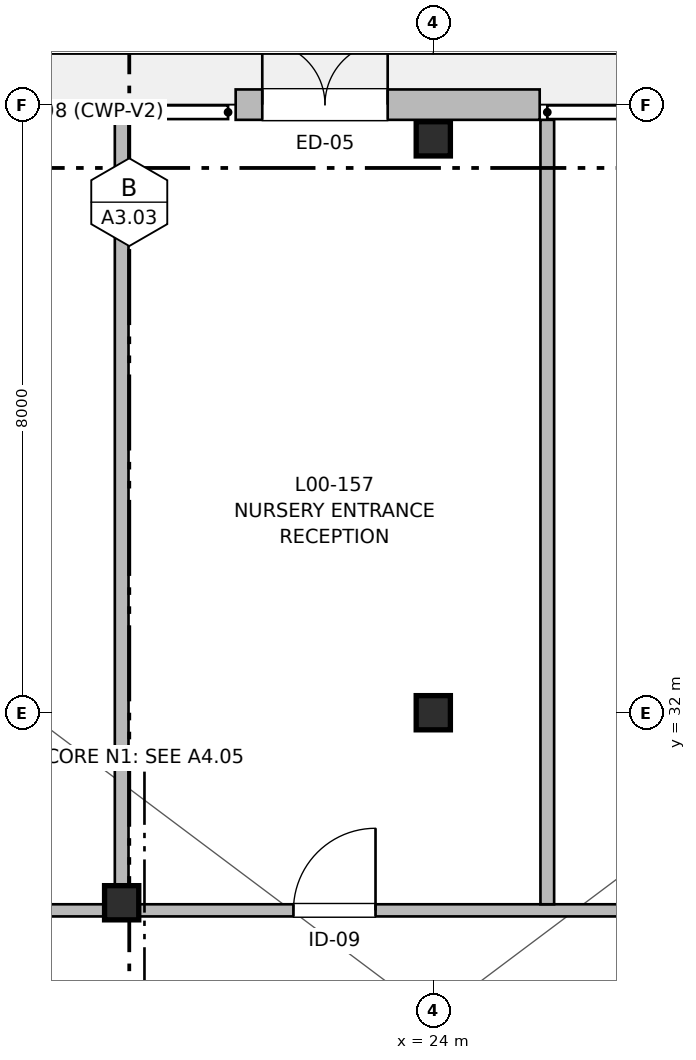
"""IFC4 building model, lengths in metres.
Left out: names, types, materials, properties, quantities, classifications, styles, units other than length and angle.
Written with IfcOpenShell. Run it as: python <this file> out.ifc"""

import sys

from ifc_helpers import new_model, si_unit, direction, frame, frame_2d, origin, origin_2d, place, context, subcontext, project, spatial, rectangle, extrude, element, fill, save


model = new_model("IFC4")
c1 = context("Model", 3, precision=1e-05, world=origin(), true_north=direction((0.0, 1.0)))
c2 = subcontext(c1, "Body", "Model", "MODEL_VIEW")
j1 = project(units=[si_unit("LENGTHUNIT", "METRE"), si_unit("PLANEANGLEUNIT", "RADIAN")], contexts=[c1])
p1 = place(None, origin())
s1 = spatial("IfcSite", under=j1, at=p1, CompositionType="ELEMENT")
p2 = place(p1, origin())
s2 = spatial("IfcBuilding", under=s1, at=p2, CompositionType="ELEMENT")
p3 = place(p2, origin())
s3 = spatial("IfcBuildingStorey", under=s2, at=p3, CompositionType="ELEMENT", Elevation=0.0)
for number, where, z_axis, x_axis in (
    (1, (19.9, 29.5, 0.0), (0.0, 0.0, 1.0), (1.0, 0.0, 0.0)),
    (2, (24.0, 32.0, 0.0), (0.0, 0.0, 1.0), (1.0, 0.0, 0.0)),
    (3, (24.0, 39.55, 0.0), (0.0, 0.0, 1.0), (1.0, 0.0, 0.0)),
):
    element("IfcColumn", number, at=place(p3, frame(where, z_axis=z_axis, x_axis=x_axis)), inside=s3, PredefinedType="COLUMN", context=c2, shape_type="SweptSolid", body=[
        extrude(rectangle(XDim=0.45, YDim=0.45, at=origin_2d()), origin(), (0.0, 0.0, 1.0), 4.16),
    ])
p4 = place(p3, frame((21.4, 40.0, 0.0), z_axis=(0.0, 0.0, 1.0), x_axis=(1.0, 0.0, 0.0)))
e4 = element("IfcWall", 4, at=p4, inside=s3, PredefinedType="SOLIDWALL", context=c2, shape_type="SweptSolid", body=[
    extrude(rectangle(XDim=4.0, YDim=0.4, at=frame_2d((2.0, 0.0))), origin(), (0.0, 0.0, 1.0), 3.9),
])
p5 = place(p4, frame((0.35, 0.0, 0.0)))
e5 = element("IfcOpeningElement", 5, at=p5, cuts=e4, PredefinedType="OPENING", context=c2, shape_type="SweptSolid", body=[
    extrude(rectangle(XDim=1.65, YDim=2.35, at=frame_2d((0.825, 1.175))), frame((0.0, 0.21, 0.0), z_axis=(0.0, -1.0, 0.0), x_axis=(1.0, 0.0, 0.0)), (0.0, 0.0, 1.0), 0.42),
])
p6 = place(p3, frame((13.5, 29.4, 0.0), z_axis=(0.0, 0.0, 1.0), x_axis=(1.0, 0.0, 0.0)))
e6 = element("IfcWall", 6, at=p6, inside=s3, PredefinedType="PARTITIONING", context=c2, shape_type="SweptSolid", body=[
    extrude(rectangle(XDim=20.45, YDim=0.16, at=frame_2d((10.225, 0.0))), origin(), (0.0, 0.0, 1.0), 3.89),
])
p7 = place(p6, frame((2.705, 0.0, 0.0)))
e7 = element("IfcOpeningElement", 7, at=p7, cuts=e6, PredefinedType="OPENING", context=c2, shape_type="SweptSolid", body=[
    extrude(rectangle(XDim=1.08, YDim=2.15, at=frame_2d((0.54, 1.075))), frame((0.0, 0.09, 0.0), z_axis=(0.0, -1.0, 0.0), x_axis=(1.0, 0.0, 0.0)), (0.0, 0.0, 1.0), 0.18),
])
p8 = place(p6, frame((8.66, 0.0, 0.0)))
e8 = element("IfcOpeningElement", 8, at=p8, cuts=e6, PredefinedType="OPENING", context=c2, shape_type="SweptSolid", body=[
    extrude(rectangle(XDim=1.08, YDim=2.15, at=frame_2d((0.54, 1.075))), frame((0.0, 0.09, 0.0), z_axis=(0.0, -1.0, 0.0), x_axis=(1.0, 0.0, 0.0)), (0.0, 0.0, 1.0), 0.18),
])
p9 = place(p6, frame((14.56, 0.0, 0.0)))
e9 = element("IfcOpeningElement", 9, at=p9, cuts=e6, PredefinedType="OPENING", context=c2, shape_type="SweptSolid", body=[
    extrude(rectangle(XDim=1.08, YDim=2.15, at=frame_2d((0.54, 1.075))), frame((0.0, 0.09, 0.0), z_axis=(0.0, -1.0, 0.0), x_axis=(1.0, 0.0, 0.0)), (0.0, 0.0, 1.0), 0.18),
])
p10 = place(p6, frame((17.64, 0.0, 0.0)))
e10 = element("IfcOpeningElement", 10, at=p10, cuts=e6, PredefinedType="OPENING", context=c2, shape_type="SweptSolid", body=[
    extrude(rectangle(XDim=1.08, YDim=2.15, at=frame_2d((0.54, 1.075))), frame((0.0, 0.09, 0.0), z_axis=(0.0, -1.0, 0.0), x_axis=(1.0, 0.0, 0.0)), (0.0, 0.0, 1.0), 0.18),
])
for number, where, z_axis, x_axis in (
    (11, (19.9, 29.48, 0.0), (0.0, 0.0, 1.0), (0.0, 1.0, 0.0)),
    (12, (25.5, 29.48, 0.0), (0.0, 0.0, 1.0), (0.0, 1.0, 0.0)),
):
    element("IfcWall", number, at=place(p3, frame(where, z_axis=z_axis, x_axis=x_axis)), inside=s3, PredefinedType="PARTITIONING", context=c2, shape_type="SweptSolid", body=[
        extrude(rectangle(XDim=10.32, YDim=0.18, at=frame_2d((5.16, 0.0))), origin(), (0.0, 0.0, 1.0), 3.89),
    ])
p11 = place(p5, origin())
e13 = element("IfcDoor", 13, at=p11, inside=s3, OperationType="DOUBLE_DOOR_SINGLE_SWING", PredefinedType="DOOR", context=c2, shape_type="SweptSolid", body=[
    extrude(rectangle(XDim=1.65, YDim=2.35, at=frame_2d((0.825, 1.175))), frame((0.0, 0.025, 0.0), z_axis=(0.0, -1.0, 0.0), x_axis=(1.0, 0.0, 0.0)), (0.0, 0.0, 1.0), 0.05),
])
fill(e5, e13)
p12 = place(p8, origin())
e14 = element("IfcDoor", 14, at=p12, inside=s3, OperationType="SINGLE_SWING_RIGHT", PredefinedType="DOOR", context=c2, shape_type="SweptSolid", body=[
    extrude(rectangle(XDim=1.08, YDim=2.15, at=frame_2d((0.54, 1.075))), frame((0.0, 0.025, 0.0), z_axis=(0.0, -1.0, 0.0), x_axis=(1.0, 0.0, 0.0)), (0.0, 0.0, 1.0), 0.05),
])
fill(e8, e14)
save(model, sys.argv[1])
